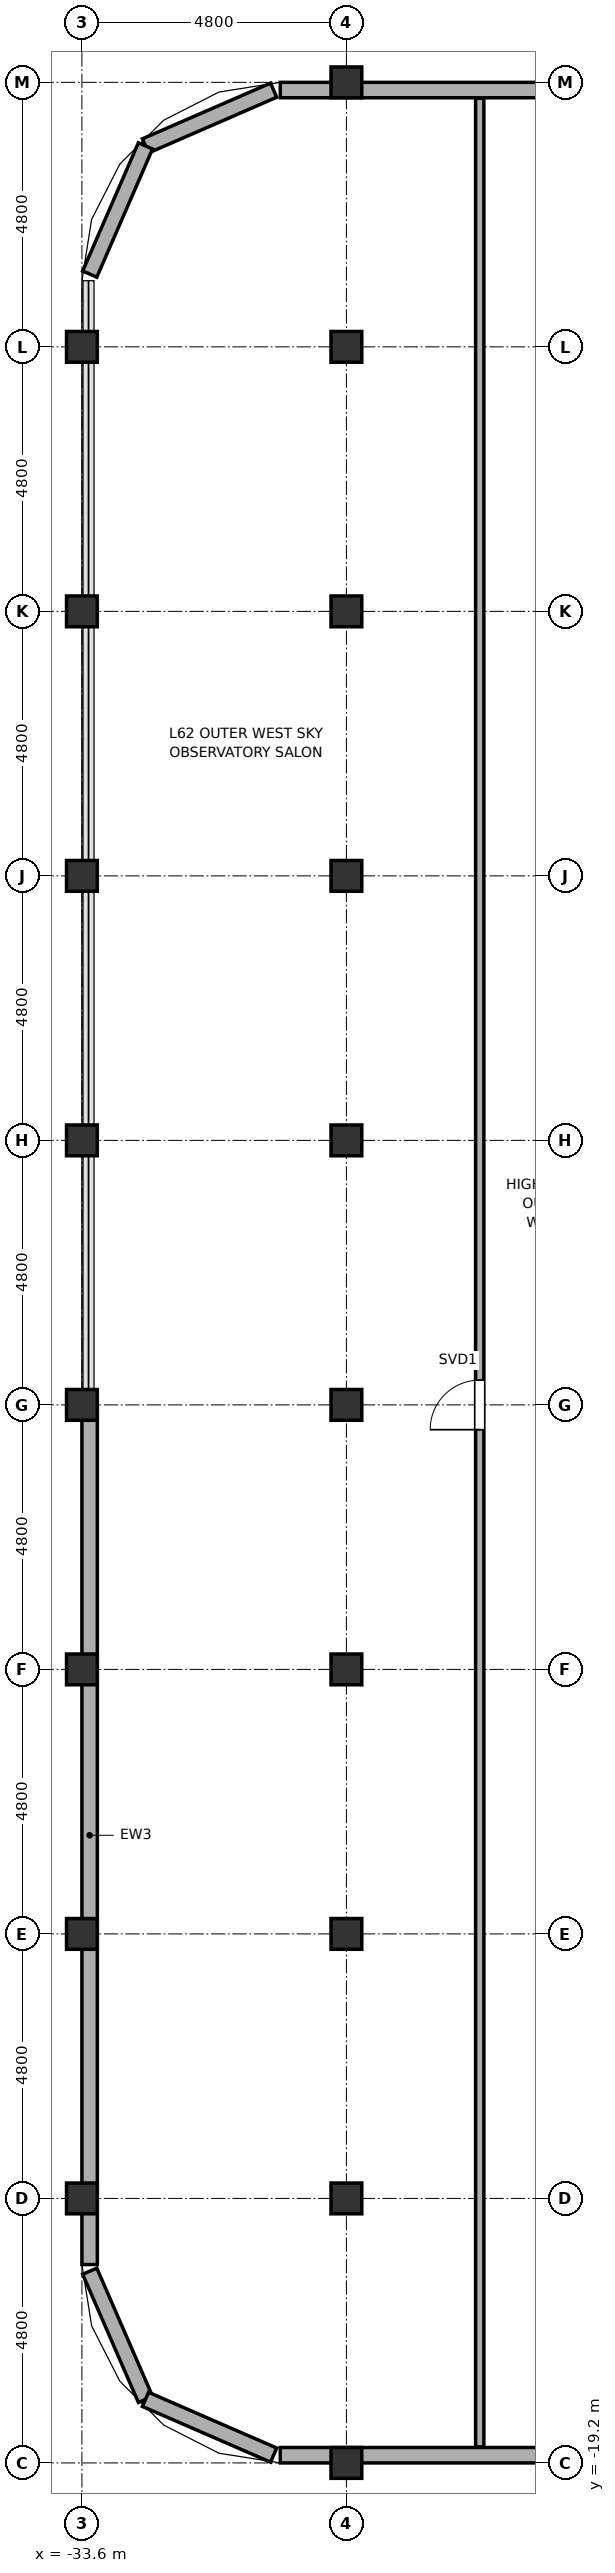
"""IFC4 building model, lengths in metres.
Left out: names, types, materials, properties, quantities, classifications, styles, units other than length and angle.
Written with IfcOpenShell. Run it as: python <this file> out.ifc"""

import sys

from ifc_helpers import new_model, si_unit, direction, frame, frame_2d, origin, origin_2d, place, context, subcontext, project, spatial, rectangle, hollow_circle, extrude, element, fill, save


model = new_model("IFC4")
c1 = context("Model", 3, precision=1e-05, world=origin(), true_north=direction((0.0, 1.0)))
c2 = subcontext(c1, "Body", "Model", "MODEL_VIEW")
j1 = project(units=[si_unit("LENGTHUNIT", "METRE"), si_unit("PLANEANGLEUNIT", "RADIAN")], contexts=[c1])
p1 = place(None, origin())
s1 = spatial("IfcSite", under=j1, at=p1, CompositionType="ELEMENT")
p2 = place(p1, origin())
s2 = spatial("IfcBuilding", under=s1, at=p2, CompositionType="ELEMENT")
p3 = place(p2, frame((0.0, 0.0, 249.25)))
s3 = spatial("IfcBuildingStorey", under=s2, at=p3, CompositionType="ELEMENT", Elevation=249.25)
for number, where, z_axis, x_axis in (
    (1, (-33.6, -14.4, -0.18), (0.0, 0.0, 1.0), (1.0, 0.0, 0.0)),
    (2, (-33.6, -9.6, -0.18), (0.0, 0.0, 1.0), (1.0, 0.0, 0.0)),
    (3, (-33.6, -4.8, -0.18), (0.0, 0.0, 1.0), (1.0, 0.0, 0.0)),
    (4, (-33.6, 0.0, -0.18), (0.0, 0.0, 1.0), (1.0, 0.0, 0.0)),
    (5, (-33.6, 4.8, -0.18), (0.0, 0.0, 1.0), (1.0, 0.0, 0.0)),
    (6, (-33.6, 9.6, -0.18), (0.0, 0.0, 1.0), (1.0, 0.0, 0.0)),
    (7, (-33.6, 14.4, -0.18), (0.0, 0.0, 1.0), (1.0, 0.0, 0.0)),
    (8, (-33.6, 19.2, -0.18), (0.0, 0.0, 1.0), (1.0, 0.0, 0.0)),
):
    element("IfcColumn", number, at=place(p3, frame(where, z_axis=z_axis, x_axis=x_axis)), inside=s3, PredefinedType="COLUMN", context=c2, shape_type="SweptSolid", body=[
        extrude(hollow_circle(Radius=0.28, WallThickness=0.025, at=origin_2d()), origin(), (0.0, 0.0, 1.0), 4.03),
    ])
for number, where, z_axis, x_axis in (
    (9, (-28.8, -19.2, 0.0), (0.0, 0.0, 1.0), (1.0, 0.0, 0.0)),
    (10, (-28.8, -14.4, 0.0), (0.0, 0.0, 1.0), (1.0, 0.0, 0.0)),
    (11, (-28.8, -9.6, 0.0), (0.0, 0.0, 1.0), (1.0, 0.0, 0.0)),
    (12, (-28.8, -4.8, 0.0), (0.0, 0.0, 1.0), (1.0, 0.0, 0.0)),
    (13, (-28.8, 0.0, 0.0), (0.0, 0.0, 1.0), (1.0, 0.0, 0.0)),
    (14, (-28.8, 4.8, 0.0), (0.0, 0.0, 1.0), (1.0, 0.0, 0.0)),
    (15, (-28.8, 9.6, 0.0), (0.0, 0.0, 1.0), (1.0, 0.0, 0.0)),
    (16, (-28.8, 14.4, 0.0), (0.0, 0.0, 1.0), (1.0, 0.0, 0.0)),
    (17, (-28.8, 19.2, 0.0), (0.0, 0.0, 1.0), (1.0, 0.0, 0.0)),
):
    element("IfcColumn", number, at=place(p3, frame(where, z_axis=z_axis, x_axis=x_axis)), inside=s3, PredefinedType="COLUMN", context=c2, shape_type="SweptSolid", body=[
        extrude(hollow_circle(Radius=0.28, WallThickness=0.025, at=origin_2d()), origin(), (0.0, 0.0, 1.0), 3.85),
    ])
p4 = place(p3, frame((-28.8, 24.0, -0.18), z_axis=(0.0, 0.0, 1.0), x_axis=(1.0, 0.0, 0.0)))
e18 = element("IfcColumn", 18, at=p4, inside=s3, PredefinedType="COLUMN", context=c2, shape_type="SweptSolid", body=[
    extrude(hollow_circle(Radius=0.28, WallThickness=0.025, at=origin_2d()), origin(), (0.0, 0.0, 1.0), 4.03),
])
p5 = place(p3, frame((-33.458, -15.721, 0.0), z_axis=(0.0, 0.0, 1.0), x_axis=(0.398792985289, -0.917040977756, 0.0)))
e19 = element("IfcWall", 19, at=p5, inside=s3, PredefinedType="SOLIDWALL", context=c2, shape_type="SweptSolid", body=[
    extrude(rectangle(XDim=2.536, YDim=0.28, at=frame_2d((1.268, 0.0))), origin(), (0.0, 0.0, 1.0), 2.27),
])
for number, where, z_axis, x_axis in (
    (20, (-32.447, -18.047, 0.0), (0.0, 0.0, 1.0), (0.917, -0.399, 0.0)),
    (21, (-30.121, 23.858, 0.0), (0.0, 0.0, 1.0), (-0.917, -0.399, 0.0)),
):
    element("IfcWall", number, at=place(p3, frame(where, z_axis=z_axis, x_axis=x_axis)), inside=s3, PredefinedType="SOLIDWALL", context=c2, shape_type="SweptSolid", body=[
        extrude(rectangle(XDim=2.536, YDim=0.28, at=frame_2d((1.268, 0.0))), origin(), (0.0, 0.0, 1.0), 2.27),
    ])
p6 = place(p3, frame((-32.447, 22.847, 0.0), z_axis=(0.0, 0.0, 1.0), x_axis=(-0.398792985289, -0.917040977756, 0.0)))
e22 = element("IfcWall", 22, at=p6, inside=s3, PredefinedType="SOLIDWALL", context=c2, shape_type="SweptSolid", body=[
    extrude(rectangle(XDim=2.536, YDim=0.28, at=frame_2d((1.268, 0.0))), origin(), (0.0, 0.0, 1.0), 2.27),
])
p7 = place(p3, frame((-30.0, -19.06, 0.0), z_axis=(0.0, 0.0, 1.0), x_axis=(1.0, 0.0, 0.0)))
e23 = element("IfcWall", 23, at=p7, inside=s3, PredefinedType="SOLIDWALL", context=c2, shape_type="SweptSolid", body=[
    extrude(rectangle(XDim=25.25, YDim=0.28, at=frame_2d((12.625, 0.0))), origin(), (0.0, 0.0, 1.0), 2.27),
])
p8 = place(p7, frame((7.8, 0.0, 0.75)))
e24 = element("IfcOpeningElement", 24, at=p8, cuts=e23, PredefinedType="OPENING", context=c2, shape_type="SweptSolid", body=[
    extrude(rectangle(XDim=1.2, YDim=1.15, at=frame_2d((0.6, 0.575))), frame((0.0, 0.155, 0.0), z_axis=(0.0, -1.0, 0.0), x_axis=(1.0, 0.0, 0.0)), (0.0, 0.0, 1.0), 0.31),
])
p9 = place(p7, frame((12.6, 0.0, 0.75)))
e25 = element("IfcOpeningElement", 25, at=p9, cuts=e23, PredefinedType="OPENING", context=c2, shape_type="SweptSolid", body=[
    extrude(rectangle(XDim=1.2, YDim=1.15, at=frame_2d((0.6, 0.575))), frame((0.0, 0.155, 0.0), z_axis=(0.0, -1.0, 0.0), x_axis=(1.0, 0.0, 0.0)), (0.0, 0.0, 1.0), 0.31),
])
p10 = place(p7, frame((17.4, 0.0, 0.75)))
e26 = element("IfcOpeningElement", 26, at=p10, cuts=e23, PredefinedType="OPENING", context=c2, shape_type="SweptSolid", body=[
    extrude(rectangle(XDim=1.2, YDim=1.15, at=frame_2d((0.6, 0.575))), frame((0.0, 0.155, 0.0), z_axis=(0.0, -1.0, 0.0), x_axis=(1.0, 0.0, 0.0)), (0.0, 0.0, 1.0), 0.31),
])
p11 = place(p7, frame((22.2, 0.0, 0.75)))
e27 = element("IfcOpeningElement", 27, at=p11, cuts=e23, PredefinedType="OPENING", context=c2, shape_type="SweptSolid", body=[
    extrude(rectangle(XDim=1.2, YDim=1.15, at=frame_2d((0.6, 0.575))), frame((0.0, 0.155, 0.0), z_axis=(0.0, -1.0, 0.0), x_axis=(1.0, 0.0, 0.0)), (0.0, 0.0, 1.0), 0.31),
])
p12 = place(p3, frame((-30.0, 23.86, 0.0), z_axis=(0.0, 0.0, 1.0), x_axis=(1.0, 0.0, 0.0)))
e28 = element("IfcWall", 28, at=p12, inside=s3, PredefinedType="SOLIDWALL", context=c2, shape_type="SweptSolid", body=[
    extrude(rectangle(XDim=25.25, YDim=0.28, at=frame_2d((12.625, 0.0))), origin(), (0.0, 0.0, 1.0), 2.27),
])
p13 = place(p12, frame((7.8, 0.0, 0.75)))
e29 = element("IfcOpeningElement", 29, at=p13, cuts=e28, PredefinedType="OPENING", context=c2, shape_type="SweptSolid", body=[
    extrude(rectangle(XDim=1.2, YDim=1.15, at=frame_2d((0.6, 0.575))), frame((0.0, 0.155, 0.0), z_axis=(0.0, -1.0, 0.0), x_axis=(1.0, 0.0, 0.0)), (0.0, 0.0, 1.0), 0.31),
])
p14 = place(p12, frame((13.8, 0.0, 0.75)))
e30 = element("IfcOpeningElement", 30, at=p14, cuts=e28, PredefinedType="OPENING", context=c2, shape_type="SweptSolid", body=[
    extrude(rectangle(XDim=1.2, YDim=1.15, at=frame_2d((0.6, 0.575))), frame((0.0, 0.155, 0.0), z_axis=(0.0, -1.0, 0.0), x_axis=(1.0, 0.0, 0.0)), (0.0, 0.0, 1.0), 0.31),
])
p15 = place(p12, frame((17.4, 0.0, 0.75)))
e31 = element("IfcOpeningElement", 31, at=p15, cuts=e28, PredefinedType="OPENING", context=c2, shape_type="SweptSolid", body=[
    extrude(rectangle(XDim=1.2, YDim=1.15, at=frame_2d((0.6, 0.575))), frame((0.0, 0.155, 0.0), z_axis=(0.0, -1.0, 0.0), x_axis=(1.0, 0.0, 0.0)), (0.0, 0.0, 1.0), 0.31),
])
p16 = place(p12, frame((22.2, 0.0, 0.75)))
e32 = element("IfcOpeningElement", 32, at=p16, cuts=e28, PredefinedType="OPENING", context=c2, shape_type="SweptSolid", body=[
    extrude(rectangle(XDim=1.2, YDim=1.15, at=frame_2d((0.6, 0.575))), frame((0.0, 0.155, 0.0), z_axis=(0.0, -1.0, 0.0), x_axis=(1.0, 0.0, 0.0)), (0.0, 0.0, 1.0), 0.31),
])
p17 = place(p3, frame((-33.46, -15.6, 0.0), z_axis=(0.0, 0.0, 1.0), x_axis=(0.0, 1.0, 0.0)))
e33 = element("IfcWall", 33, at=p17, inside=s3, PredefinedType="SOLIDWALL", context=c2, shape_type="SweptSolid", body=[
    extrude(rectangle(XDim=15.58, YDim=0.28, at=frame_2d((7.79, 0.0))), origin(), (0.0, 0.0, 1.0), 2.27),
])
p18 = place(p3, frame((-26.38, -18.91, 0.0), z_axis=(0.0, 0.0, 1.0), x_axis=(0.0, 1.0, 0.0)))
e34 = element("IfcWall", 34, at=p18, inside=s3, PredefinedType="PARTITIONING", context=c2, shape_type="SweptSolid", body=[
    extrude(rectangle(XDim=42.62, YDim=0.15, at=frame_2d((21.31, 0.0))), origin(), (0.0, 0.0, 1.0), 2.27),
])
p19 = place(p18, frame((18.46, 0.0, 0.0)))
e35 = element("IfcOpeningElement", 35, at=p19, cuts=e34, PredefinedType="OPENING", context=c2, shape_type="SweptSolid", body=[
    extrude(rectangle(XDim=0.9, YDim=2.1, at=frame_2d((0.45, 1.05))), frame((0.0, 0.09, 0.0), z_axis=(0.0, -1.0, 0.0), x_axis=(1.0, 0.0, 0.0)), (0.0, 0.0, 1.0), 0.18),
])
p20 = place(p19, origin())
e36 = element("IfcDoor", 36, at=p20, inside=s3, OperationType="SINGLE_SWING_RIGHT", PredefinedType="DOOR", context=c2, shape_type="SweptSolid", body=[
    extrude(rectangle(XDim=0.9, YDim=2.1, at=frame_2d((0.45, 1.05))), frame((0.0, 0.025, 0.0), z_axis=(0.0, -1.0, 0.0), x_axis=(1.0, 0.0, 0.0)), (0.0, 0.0, 1.0), 0.05),
])
fill(e35, e36)
save(model, sys.argv[1])
